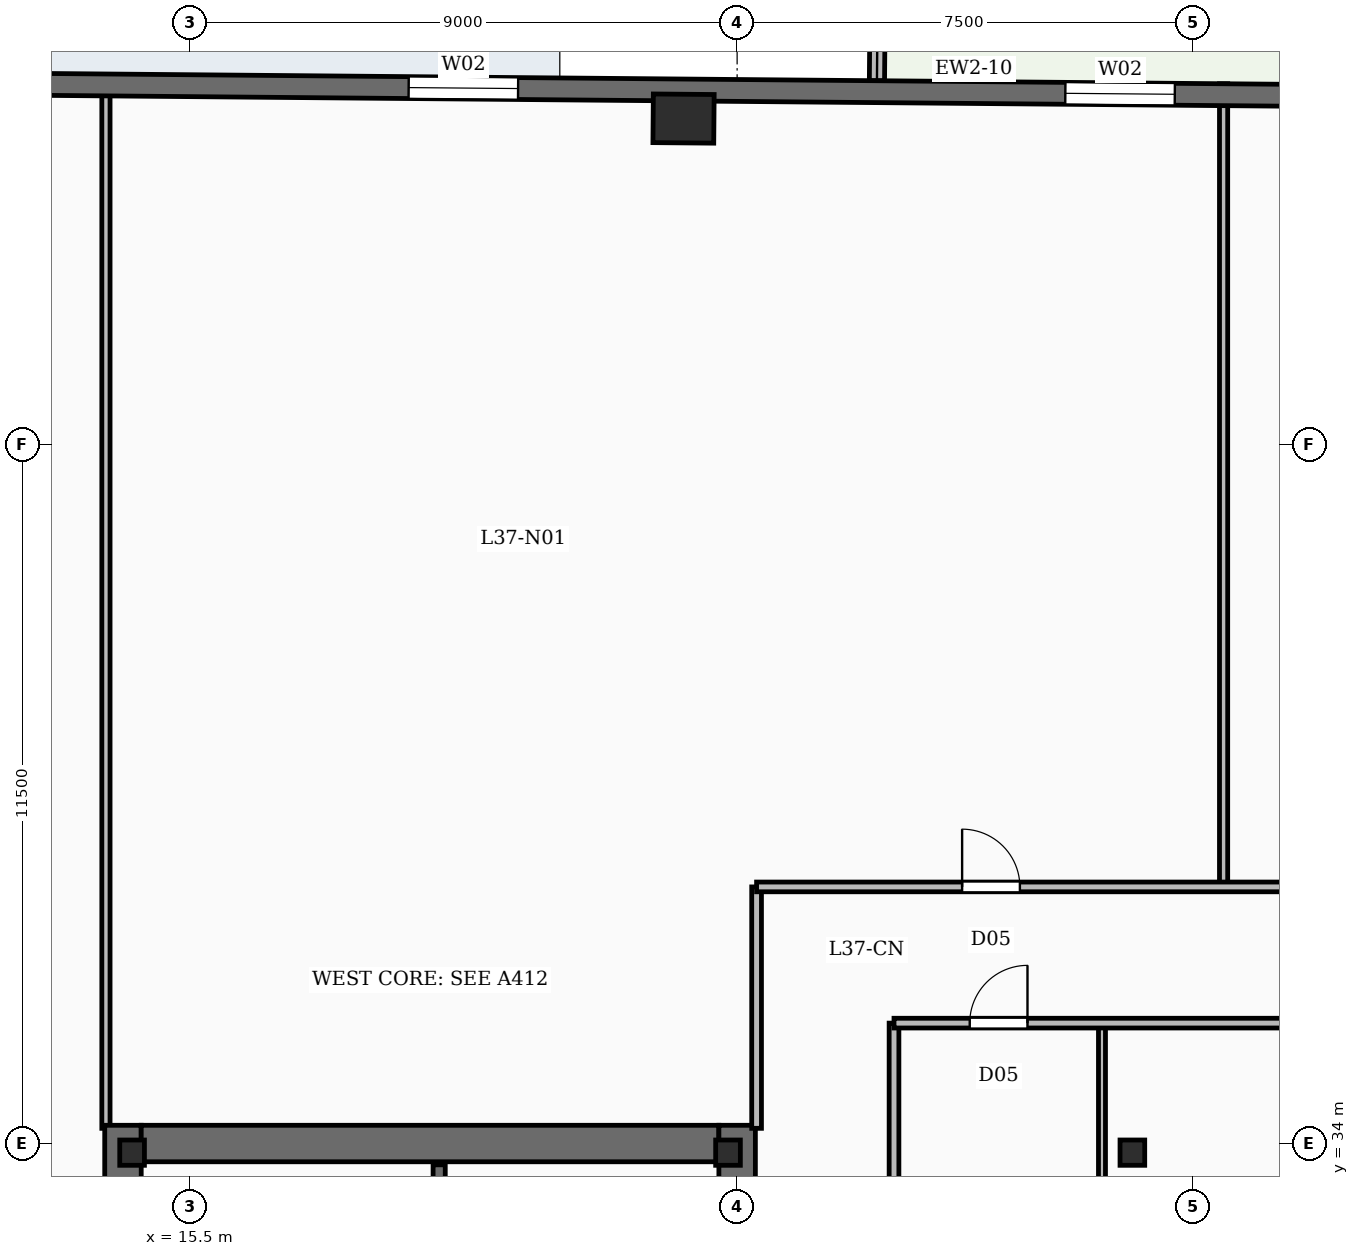
"""IFC4 building model, lengths in metres.
Left out: names, types, materials, properties, quantities, classifications, styles, units other than length and angle.
Written with IfcOpenShell. Run it as: python <this file> out.ifc"""

import sys

from ifc_helpers import new_model, si_unit, direction, frame, frame_2d, origin, origin_2d, place, context, subcontext, project, spatial, rectangle, i_section, extrude, element, fill, save


model = new_model("IFC4")
c1 = context("Model", 3, precision=1e-05, world=origin(), true_north=direction((0.0, 1.0)))
c2 = subcontext(c1, "Body", "Model", "MODEL_VIEW")
j1 = project(units=[si_unit("LENGTHUNIT", "METRE"), si_unit("PLANEANGLEUNIT", "RADIAN")], contexts=[c1])
p1 = place(None, origin())
s1 = spatial("IfcSite", under=j1, at=p1, CompositionType="ELEMENT")
p2 = place(p1, origin())
s2 = spatial("IfcBuilding", under=s1, at=p2, CompositionType="ELEMENT")
p3 = place(p2, frame((0.0, 0.0, 158.45)))
s3 = spatial("IfcBuildingStorey", under=s2, at=p3, CompositionType="ELEMENT", Elevation=158.45)
p4 = place(p3, frame((14.4, 19.0, -0.45), z_axis=(0.0, 0.0, 1.0), x_axis=(0.0, 1.0, 0.0)))
e1 = element("IfcWall", 1, at=p4, inside=s3, PredefinedType="SHEAR", context=c2, shape_type="SweptSolid", body=[
    extrude(rectangle(XDim=15.3, YDim=0.6, at=frame_2d((7.65, 0.0))), origin(), (0.0, 0.0, 1.0), 3.93),
])
p5 = place(p3, frame((24.5, 19.0, -0.45), z_axis=(0.0, 0.0, 1.0), x_axis=(0.0, 1.0, 0.0)))
e2 = element("IfcWall", 2, at=p5, inside=s3, PredefinedType="SHEAR", context=c2, shape_type="SweptSolid", body=[
    extrude(rectangle(XDim=15.3, YDim=0.6, at=frame_2d((7.65, 0.0))), origin(), (0.0, 0.0, 1.0), 3.93),
])
p6 = place(p5, frame((2.5, 0.0, 0.45)))
e3 = element("IfcOpeningElement", 3, at=p6, cuts=e2, PredefinedType="OPENING", context=c2, shape_type="SweptSolid", body=[
    extrude(rectangle(XDim=1.05, YDim=2.15, at=frame_2d((0.525, 1.075))), frame((0.0, 0.31, 0.0), z_axis=(0.0, -1.0, 0.0), x_axis=(1.0, 0.0, 0.0)), (0.0, 0.0, 1.0), 0.62),
])
p7 = place(p5, frame((7.0, 0.0, 0.45)))
e4 = element("IfcOpeningElement", 4, at=p7, cuts=e2, PredefinedType="OPENING", context=c2, shape_type="SweptSolid", body=[
    extrude(rectangle(XDim=1.05, YDim=2.15, at=frame_2d((0.525, 1.075))), frame((0.0, 0.31, 0.0), z_axis=(0.0, -1.0, 0.0), x_axis=(1.0, 0.0, 0.0)), (0.0, 0.0, 1.0), 0.62),
])
p8 = place(p3, frame((14.7, 34.0, -0.45), z_axis=(0.0, 0.0, 1.0), x_axis=(1.0, 0.0, 0.0)))
e5 = element("IfcWall", 5, at=p8, inside=s3, PredefinedType="SHEAR", context=c2, shape_type="SweptSolid", body=[
    extrude(rectangle(XDim=9.5, YDim=0.6, at=frame_2d((4.75, 0.0))), origin(), (0.0, 0.0, 1.0), 3.93),
])
for number, where, z_axis, x_axis in (
    (6, (14.55, 33.85, -0.45), (0.0, 0.0, 1.0), (1.0, 0.0, 0.0)),
    (7, (24.35, 33.85, -0.45), (0.0, 0.0, 1.0), (1.0, 0.0, 0.0)),
    (8, (31.0, 33.85, -0.45), (0.0, 0.0, 1.0), (1.0, 0.0, 0.0)),
):
    element("IfcColumn", number, at=place(p3, frame(where, z_axis=z_axis, x_axis=x_axis)), inside=s3, PredefinedType="COLUMN", context=c2, shape_type="SweptSolid", body=[
        extrude(i_section(OverallWidth=0.406, OverallDepth=0.416, WebThickness=0.03, FlangeThickness=0.048, FilletRadius=0.02, at=origin_2d()), origin(), (0.0, 0.0, 1.0), 3.93),
    ])
p9 = place(p3, frame((23.619, 50.855, -0.45), z_axis=(0.0, 0.0, 1.0), x_axis=(0.999961923064, -0.008726535498, 0.0)))
e9 = element("IfcColumn", 9, at=p9, inside=s3, PredefinedType="COLUMN", context=c2, shape_type="SweptSolid", body=[
    extrude(rectangle(XDim=1.0, YDim=0.8, at=origin_2d()), origin(), (0.0, 0.0, 1.0), 3.93),
])
p10 = place(p3, frame((11.098, 51.435, 0.0), z_axis=(0.0, 0.0, 1.0), x_axis=(0.99996191194, -0.008727810138, 0.0)))
e10 = element("IfcWall", 10, at=p10, inside=s3, PredefinedType="SOLIDWALL", context=c2, shape_type="SweptSolid", body=[
    extrude(rectangle(XDim=49.4, YDim=0.36, at=frame_2d((24.7, 0.0))), origin(), (0.0, 0.0, 1.0), 3.48),
])
p11 = place(p10, frame((27.6, 0.0, 0.0)))
e11 = element("IfcOpeningElement", 11, at=p11, cuts=e10, PredefinedType="OPENING", context=c2, shape_type="SweptSolid", body=[
    extrude(rectangle(XDim=1.8, YDim=2.25, at=frame_2d((0.9, 1.125))), frame((0.0, 0.19, 0.0), z_axis=(0.0, -1.0, 0.0), x_axis=(1.0, 0.0, 0.0)), (0.0, 0.0, 1.0), 0.38),
])
p12 = place(p10, frame((8.0, 0.0, 0.88)))
e12 = element("IfcOpeningElement", 12, at=p12, cuts=e10, PredefinedType="OPENING", context=c2, shape_type="SweptSolid", body=[
    extrude(rectangle(XDim=1.8, YDim=2.15, at=frame_2d((0.9, 1.075))), frame((0.0, 0.19, 0.0), z_axis=(0.0, -1.0, 0.0), x_axis=(1.0, 0.0, 0.0)), (0.0, 0.0, 1.0), 0.38),
])
p13 = place(p10, frame((18.8, 0.0, 0.88)))
e13 = element("IfcOpeningElement", 13, at=p13, cuts=e10, PredefinedType="OPENING", context=c2, shape_type="SweptSolid", body=[
    extrude(rectangle(XDim=1.8, YDim=2.15, at=frame_2d((0.9, 1.075))), frame((0.0, 0.19, 0.0), z_axis=(0.0, -1.0, 0.0), x_axis=(1.0, 0.0, 0.0)), (0.0, 0.0, 1.0), 0.38),
])
p14 = place(p10, frame((40.4, 0.0, 0.88)))
e14 = element("IfcOpeningElement", 14, at=p14, cuts=e10, PredefinedType="OPENING", context=c2, shape_type="SweptSolid", body=[
    extrude(rectangle(XDim=1.8, YDim=2.15, at=frame_2d((0.9, 1.075))), frame((0.0, 0.19, 0.0), z_axis=(0.0, -1.0, 0.0), x_axis=(1.0, 0.0, 0.0)), (0.0, 0.0, 1.0), 0.38),
])
p15 = place(p3, frame((26.799, 51.478, 0.0), z_axis=(0.0, 0.0, 1.0), x_axis=(0.008748393587, 0.999961732073, 0.0)))
e15 = element("IfcWall", 15, at=p15, inside=s3, PredefinedType="PARAPET", context=c2, shape_type="SweptSolid", body=[
    extrude(rectangle(XDim=2.4, YDim=0.25, at=frame_2d((1.2, 0.0))), origin(), (0.0, 0.0, 1.0), 1.12),
])
p16 = place(p3, frame((19.6, 32.37, 0.0), z_axis=(0.0, 0.0, 1.0), x_axis=(0.0, 1.0, 0.0)))
e16 = element("IfcWall", 16, at=p16, inside=s3, PredefinedType="SOLIDWALL", context=c2, shape_type="SweptSolid", body=[
    extrude(rectangle(XDim=1.28, YDim=0.2, at=frame_2d((0.64, 0.0))), origin(), (0.0, 0.0, 1.0), 3.48),
])
p17 = place(p3, frame((32.5, 38.22, 0.0), z_axis=(0.0, 0.0, 1.0), x_axis=(0.0, 1.0, 0.0)))
e17 = element("IfcWall", 17, at=p17, inside=s3, PredefinedType="PARTITIONING", context=c2, shape_type="SweptSolid", body=[
    extrude(rectangle(XDim=13.208, YDim=0.135, at=frame_2d((6.604, 0.0))), origin(), (0.0, 0.0, 1.0), 2.54),
])
p18 = place(p3, frame((24.82, 34.25, 0.0), z_axis=(0.0, 0.0, 1.0), x_axis=(0.0, 1.0, 0.0)))
e18 = element("IfcWall", 18, at=p18, inside=s3, PredefinedType="PARTITIONING", context=c2, shape_type="SweptSolid", body=[
    extrude(rectangle(XDim=3.97, YDim=0.16, at=frame_2d((1.985, 0.0))), origin(), (0.0, 0.0, 1.0), 2.54),
])
p19 = place(p3, frame((14.12, 34.25, 0.0), z_axis=(0.0, 0.0, 1.0), x_axis=(0.0, 1.0, 0.0)))
e19 = element("IfcWall", 19, at=p19, inside=s3, PredefinedType="PARTITIONING", context=c2, shape_type="SweptSolid", body=[
    extrude(rectangle(XDim=17.098, YDim=0.135, at=frame_2d((8.549, 0.0))), origin(), (0.0, 0.0, 1.0), 2.54),
])
p20 = place(p3, frame((24.82, 38.22, 0.0), z_axis=(0.0, 0.0, 1.0), x_axis=(1.0, 0.0, 0.0)))
e20 = element("IfcWall", 20, at=p20, inside=s3, PredefinedType="PARTITIONING", context=c2, shape_type="SweptSolid", body=[
    extrude(rectangle(XDim=25.26, YDim=0.16, at=frame_2d((12.63, 0.0))), origin(), (0.0, 0.0, 1.0), 2.54),
])
p21 = place(p20, frame((3.38, 0.0, 0.0)))
e21 = element("IfcOpeningElement", 21, at=p21, cuts=e20, PredefinedType="OPENING", context=c2, shape_type="SweptSolid", body=[
    extrude(rectangle(XDim=0.95, YDim=2.15, at=frame_2d((0.475, 1.075))), frame((0.0, 0.09, 0.0), z_axis=(0.0, -1.0, 0.0), x_axis=(1.0, 0.0, 0.0)), (0.0, 0.0, 1.0), 0.18),
])
p22 = place(p20, frame((12.205, 0.0, 0.0)))
e22 = element("IfcOpeningElement", 22, at=p22, cuts=e20, PredefinedType="OPENING", context=c2, shape_type="SweptSolid", body=[
    extrude(rectangle(XDim=0.95, YDim=2.15, at=frame_2d((0.475, 1.075))), frame((0.0, 0.09, 0.0), z_axis=(0.0, -1.0, 0.0), x_axis=(1.0, 0.0, 0.0)), (0.0, 0.0, 1.0), 0.18),
])
p23 = place(p20, frame((20.98, 0.0, 0.0)))
e23 = element("IfcOpeningElement", 23, at=p23, cuts=e20, PredefinedType="OPENING", context=c2, shape_type="SweptSolid", body=[
    extrude(rectangle(XDim=0.95, YDim=2.15, at=frame_2d((0.475, 1.075))), frame((0.0, 0.09, 0.0), z_axis=(0.0, -1.0, 0.0), x_axis=(1.0, 0.0, 0.0)), (0.0, 0.0, 1.0), 0.18),
])
p24 = place(p3, frame((30.5, 15.38, 0.0), z_axis=(0.0, 0.0, 1.0), x_axis=(0.0, 1.0, 0.0)))
e24 = element("IfcWall", 24, at=p24, inside=s3, PredefinedType="PARTITIONING", context=c2, shape_type="SweptSolid", body=[
    extrude(rectangle(XDim=20.6, YDim=0.115, at=frame_2d((10.3, 0.0))), origin(), (0.0, 0.0, 1.0), 2.54),
])
p25 = place(p3, frame((27.08, 35.98, 0.0), z_axis=(0.0, 0.0, 1.0), x_axis=(1.0, 0.0, 0.0)))
e25 = element("IfcWall", 25, at=p25, inside=s3, PredefinedType="PARTITIONING", context=c2, shape_type="SweptSolid", body=[
    extrude(rectangle(XDim=20.74, YDim=0.16, at=frame_2d((10.37, 0.0))), origin(), (0.0, 0.0, 1.0), 2.54),
])
p26 = place(p25, frame((1.245, 0.0, 0.0)))
e26 = element("IfcOpeningElement", 26, at=p26, cuts=e25, PredefinedType="OPENING", context=c2, shape_type="SweptSolid", body=[
    extrude(rectangle(XDim=0.95, YDim=2.15, at=frame_2d((0.475, 1.075))), frame((0.0, 0.09, 0.0), z_axis=(0.0, -1.0, 0.0), x_axis=(1.0, 0.0, 0.0)), (0.0, 0.0, 1.0), 0.18),
])
p27 = place(p25, frame((6.445, 0.0, 0.0)))
e27 = element("IfcOpeningElement", 27, at=p27, cuts=e25, PredefinedType="OPENING", context=c2, shape_type="SweptSolid", body=[
    extrude(rectangle(XDim=0.95, YDim=2.15, at=frame_2d((0.475, 1.075))), frame((0.0, 0.09, 0.0), z_axis=(0.0, -1.0, 0.0), x_axis=(1.0, 0.0, 0.0)), (0.0, 0.0, 1.0), 0.18),
])
p28 = place(p25, frame((13.195, 0.0, 0.0)))
e28 = element("IfcOpeningElement", 28, at=p28, cuts=e25, PredefinedType="OPENING", context=c2, shape_type="SweptSolid", body=[
    extrude(rectangle(XDim=0.95, YDim=2.15, at=frame_2d((0.475, 1.075))), frame((0.0, 0.09, 0.0), z_axis=(0.0, -1.0, 0.0), x_axis=(1.0, 0.0, 0.0)), (0.0, 0.0, 1.0), 0.18),
])
p29 = place(p25, frame((18.345, 0.0, 0.0)))
e29 = element("IfcOpeningElement", 29, at=p29, cuts=e25, PredefinedType="OPENING", context=c2, shape_type="SweptSolid", body=[
    extrude(rectangle(XDim=0.95, YDim=2.15, at=frame_2d((0.475, 1.075))), frame((0.0, 0.09, 0.0), z_axis=(0.0, -1.0, 0.0), x_axis=(1.0, 0.0, 0.0)), (0.0, 0.0, 1.0), 0.18),
])
p30 = place(p3, frame((27.08, 15.38, 0.0), z_axis=(0.0, 0.0, 1.0), x_axis=(0.0, 1.0, 0.0)))
e30 = element("IfcWall", 30, at=p30, inside=s3, PredefinedType="PARTITIONING", context=c2, shape_type="SweptSolid", body=[
    extrude(rectangle(XDim=20.6, YDim=0.16, at=frame_2d((10.3, 0.0))), origin(), (0.0, 0.0, 1.0), 2.54),
])
p31 = place(p12, origin())
e31 = element("IfcWindow", 31, at=p31, inside=s3, PartitioningType="DOUBLE_PANEL_VERTICAL", PredefinedType="WINDOW", context=c2, shape_type="SweptSolid", body=[
    extrude(rectangle(XDim=1.8, YDim=2.15, at=frame_2d((0.9, 1.075))), frame((0.0, 0.03, 0.0), z_axis=(0.0, -1.0, 0.0), x_axis=(1.0, 0.0, 0.0)), (0.0, 0.0, 1.0), 0.06),
])
fill(e12, e31)
p32 = place(p13, origin())
e32 = element("IfcWindow", 32, at=p32, inside=s3, PartitioningType="DOUBLE_PANEL_VERTICAL", PredefinedType="WINDOW", context=c2, shape_type="SweptSolid", body=[
    extrude(rectangle(XDim=1.8, YDim=2.15, at=frame_2d((0.9, 1.075))), frame((0.0, 0.03, 0.0), z_axis=(0.0, -1.0, 0.0), x_axis=(1.0, 0.0, 0.0)), (0.0, 0.0, 1.0), 0.06),
])
fill(e13, e32)
p33 = place(p21, origin())
e33 = element("IfcDoor", 33, at=p33, inside=s3, OperationType="SINGLE_SWING_LEFT", PredefinedType="DOOR", context=c2, shape_type="SweptSolid", body=[
    extrude(rectangle(XDim=0.95, YDim=2.15, at=frame_2d((0.475, 1.075))), frame((0.0, 0.025, 0.0), z_axis=(0.0, -1.0, 0.0), x_axis=(1.0, 0.0, 0.0)), (0.0, 0.0, 1.0), 0.05),
])
fill(e21, e33)
p34 = place(p26, origin())
e34 = element("IfcDoor", 34, at=p34, inside=s3, OperationType="SINGLE_SWING_RIGHT", PredefinedType="DOOR", context=c2, shape_type="SweptSolid", body=[
    extrude(rectangle(XDim=0.95, YDim=2.15, at=frame_2d((0.475, 1.075))), frame((0.0, 0.025, 0.0), z_axis=(0.0, -1.0, 0.0), x_axis=(1.0, 0.0, 0.0)), (0.0, 0.0, 1.0), 0.05),
])
fill(e26, e34)
save(model, sys.argv[1])
